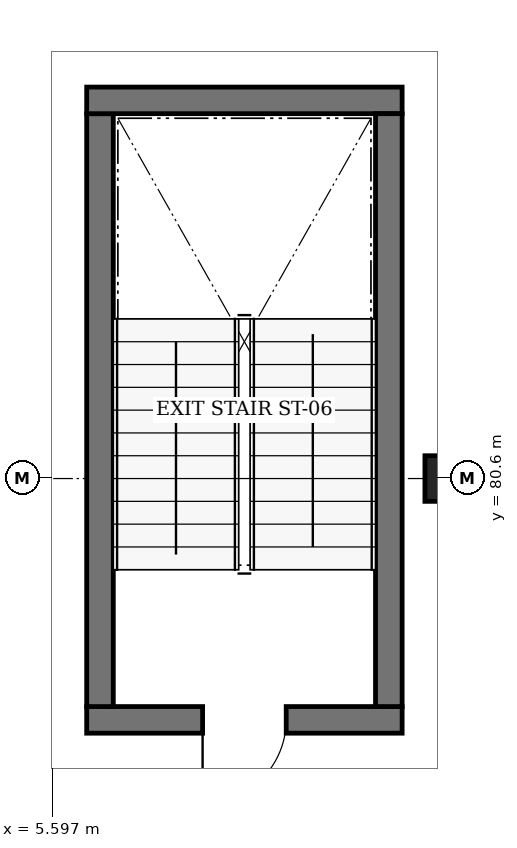
"""IFC4 building model, lengths in metres.
Left out: names, types, materials, properties, quantities, classifications, styles, units other than length and angle.
Written with IfcOpenShell. Run it as: python <this file> out.ifc"""

import sys

from ifc_helpers import new_model, si_unit, direction, frame, frame_2d, origin, origin_2d, place, context, subcontext, project, spatial, rectangle, extrude, element, fill, save


model = new_model("IFC4")
c1 = context("Model", 3, precision=1e-05, world=origin(), true_north=direction((0.0, 1.0)))
c2 = subcontext(c1, "Body", "Model", "MODEL_VIEW")
j1 = project(units=[si_unit("LENGTHUNIT", "METRE"), si_unit("PLANEANGLEUNIT", "RADIAN")], contexts=[c1])
p1 = place(None, origin())
s1 = spatial("IfcSite", under=j1, at=p1, CompositionType="ELEMENT")
p2 = place(p1, origin())
s2 = spatial("IfcBuilding", under=s1, at=p2, CompositionType="ELEMENT")
p3 = place(p2, frame((0.0, 0.0, 9.0)))
s3 = spatial("IfcBuildingStorey", under=s2, at=p3, CompositionType="ELEMENT", Elevation=9.0)
p4 = place(p3, frame((10.8, 80.6, 0.0), z_axis=(0.0, 0.0, 1.0), x_axis=(1.0, 0.0, 0.0)))
e1 = element("IfcColumn", 1, at=p4, inside=s3, PredefinedType="COLUMN", context=c2, shape_type="SweptSolid", body=[
    extrude(rectangle(XDim=0.6, YDim=0.6, at=origin_2d()), origin(), (0.0, 0.0, 1.0), 4.2),
])
p5 = place(p3, frame((10.2, 77.425, 0.0), z_axis=(0.0, 0.0, 1.0), x_axis=(-1.0, 0.0, 0.0)))
e2 = element("IfcWall", 2, at=p5, inside=s3, PredefinedType="SOLIDWALL", context=c2, shape_type="SweptSolid", body=[
    extrude(rectangle(XDim=4.15, YDim=0.35, at=frame_2d((2.075, 0.0))), origin(), (0.0, 0.0, 1.0), 4.2),
])
p6 = place(p5, frame((1.525, 0.0, 0.0)))
e3 = element("IfcOpeningElement", 3, at=p6, cuts=e2, PredefinedType="OPENING", context=c2, shape_type="SweptSolid", body=[
    extrude(rectangle(XDim=1.1, YDim=2.15, at=frame_2d((0.55, 1.075))), frame((0.0, 0.195, 0.0), z_axis=(0.0, -1.0, 0.0), x_axis=(1.0, 0.0, 0.0)), (0.0, 0.0, 1.0), 0.39),
])
p7 = place(p3, frame((6.225, 77.6, 0.0), z_axis=(0.0, 0.0, 1.0), x_axis=(0.0, 1.0, 0.0)))
e4 = element("IfcWall", 4, at=p7, inside=s3, PredefinedType="SOLIDWALL", context=c2, shape_type="SweptSolid", body=[
    extrude(rectangle(XDim=7.8, YDim=0.35, at=frame_2d((3.9, 0.0))), origin(), (0.0, 0.0, 1.0), 4.2),
])
p8 = place(p3, frame((6.05, 85.575, 0.0), z_axis=(0.0, 0.0, 1.0), x_axis=(1.0, 0.0, 0.0)))
e5 = element("IfcWall", 5, at=p8, inside=s3, PredefinedType="SOLIDWALL", context=c2, shape_type="SweptSolid", body=[
    extrude(rectangle(XDim=4.15, YDim=0.35, at=frame_2d((2.075, 0.0))), origin(), (0.0, 0.0, 1.0), 4.2),
])
p9 = place(p3, frame((10.025, 85.4, 0.0), z_axis=(0.0, 0.0, 1.0), x_axis=(0.0, -1.0, 0.0)))
e6 = element("IfcWall", 6, at=p9, inside=s3, PredefinedType="SOLIDWALL", context=c2, shape_type="SweptSolid", body=[
    extrude(rectangle(XDim=7.8, YDim=0.35, at=frame_2d((3.9, 0.0))), origin(), (0.0, 0.0, 1.0), 4.2),
])
p10 = place(p6, origin())
e7 = element("IfcDoor", 7, at=p10, inside=s3, OperationType="SINGLE_SWING_RIGHT", PredefinedType="DOOR", context=c2, shape_type="SweptSolid", body=[
    extrude(rectangle(XDim=1.1, YDim=2.15, at=frame_2d((0.55, 1.075))), frame((0.0, 0.025, 0.0), z_axis=(0.0, -1.0, 0.0), x_axis=(1.0, 0.0, 0.0)), (0.0, 0.0, 1.0), 0.05),
])
fill(e3, e7)
save(model, sys.argv[1])
